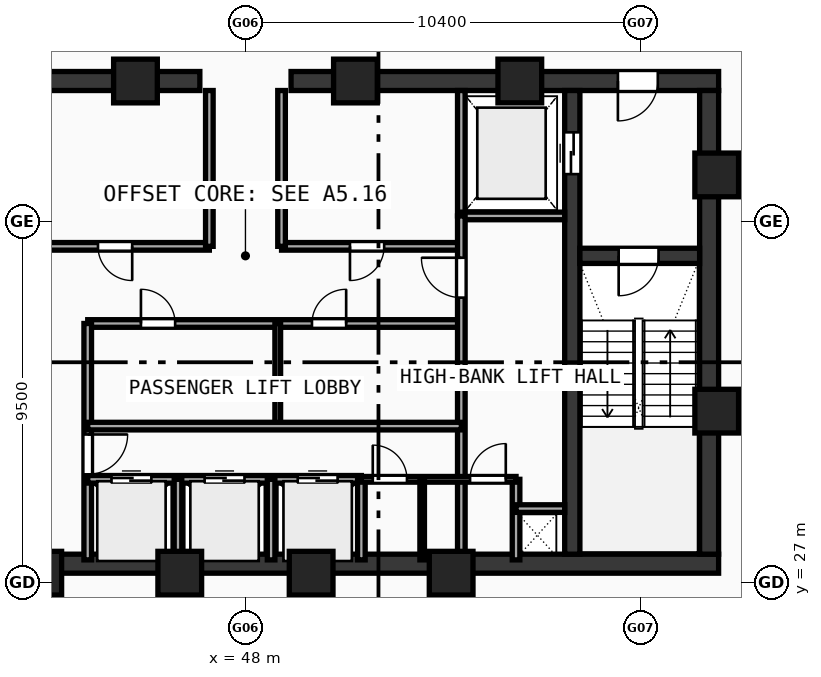
"""IFC4 building model, lengths in metres.
Left out: names, types, materials, properties, quantities, classifications, styles, units other than length and angle.
Written with IfcOpenShell. Run it as: python <this file> out.ifc"""

import sys

from ifc_helpers import new_model, si_unit, direction, frame, frame_2d, origin, origin_with_axes, origin_2d, place, context, subcontext, project, spatial, rectangle, hollow_rectangle, extrude, source, transform, mapped, element, fill, save


model = new_model("IFC4")
c1 = context("Model", 3, precision=1e-05, world=origin(), true_north=direction((0.0, 1.0)))
c2 = subcontext(c1, "Body", "Model", "MODEL_VIEW")
j1 = project(units=[si_unit("LENGTHUNIT", "METRE"), si_unit("PLANEANGLEUNIT", "RADIAN")], contexts=[c1])
p1 = place(None, origin())
s1 = spatial("IfcSite", under=j1, at=p1, CompositionType="ELEMENT")
p2 = place(p1, origin())
s2 = spatial("IfcBuilding", under=s1, at=p2, CompositionType="ELEMENT")
p3 = place(p2, frame((0.0, 0.0, 296.21)))
s3 = spatial("IfcBuildingStorey", under=s2, at=p3, CompositionType="ELEMENT", Elevation=296.21)
p4 = place(p3, frame((35.55, 27.5, 0.0), z_axis=(0.0, 0.0, 1.0), x_axis=(1.0, 0.0, 0.0)))
e1 = element("IfcWall", 1, at=p4, inside=s3, PredefinedType="SHEAR", context=c2, shape_type="SweptSolid", body=[
    extrude(rectangle(XDim=24.9, YDim=0.5, at=frame_2d((12.45, 0.0))), origin(), (0.0, 0.0, 1.0), 3.47),
])
p5 = place(p3, frame((35.55, 40.2, 0.0), z_axis=(0.0, 0.0, 1.0), x_axis=(1.0, 0.0, 0.0)))
e2 = element("IfcWall", 2, at=p5, inside=s3, PredefinedType="SHEAR", context=c2, shape_type="SweptSolid", body=[
    extrude(rectangle(XDim=11.25, YDim=0.5, at=frame_2d((5.625, 0.0))), origin(), (0.0, 0.0, 1.0), 3.47),
])
p6 = place(p5, frame((1.6, 0.0, 0.0)))
e3 = element("IfcOpeningElement", 3, at=p6, cuts=e2, PredefinedType="OPENING", context=c2, shape_type="SweptSolid", body=[
    extrude(rectangle(XDim=1.05, YDim=2.1, at=frame_2d((0.525, 1.05))), frame((0.0, 0.26, 0.0), z_axis=(0.0, -1.0, 0.0), x_axis=(1.0, 0.0, 0.0)), (0.0, 0.0, 1.0), 0.52),
])
p7 = place(p3, frame((49.2, 40.2, 0.0), z_axis=(0.0, 0.0, 1.0), x_axis=(1.0, 0.0, 0.0)))
e4 = element("IfcWall", 4, at=p7, inside=s3, PredefinedType="SHEAR", context=c2, shape_type="SweptSolid", body=[
    extrude(rectangle(XDim=11.25, YDim=0.5, at=frame_2d((5.625, 0.0))), origin(), (0.0, 0.0, 1.0), 3.47),
])
p8 = place(p7, frame((8.6, 0.0, 0.0)))
e5 = element("IfcOpeningElement", 5, at=p8, cuts=e4, PredefinedType="OPENING", context=c2, shape_type="SweptSolid", body=[
    extrude(rectangle(XDim=1.05, YDim=2.1, at=frame_2d((0.525, 1.05))), frame((0.0, 0.26, 0.0), z_axis=(0.0, -1.0, 0.0), x_axis=(1.0, 0.0, 0.0)), (0.0, 0.0, 1.0), 0.52),
])
p9 = place(p3, frame((60.2, 27.75, 0.0), z_axis=(0.0, 0.0, 1.0), x_axis=(0.0, 1.0, 0.0)))
e6 = element("IfcWall", 6, at=p9, inside=s3, PredefinedType="SHEAR", context=c2, shape_type="SweptSolid", body=[
    extrude(rectangle(XDim=12.2, YDim=0.5, at=frame_2d((6.1, 0.0))), origin(), (0.0, 0.0, 1.0), 3.47),
])
p10 = place(p3, frame((56.6, 27.75, 0.0), z_axis=(0.0, 0.0, 1.0), x_axis=(0.0, 1.0, 0.0)))
e7 = element("IfcWall", 7, at=p10, inside=s3, PredefinedType="SHEAR", context=c2, shape_type="SweptSolid", body=[
    extrude(rectangle(XDim=12.2, YDim=0.4, at=frame_2d((6.1, 0.0))), origin(), (0.0, 0.0, 1.0), 3.47),
])
p11 = place(p10, frame((10.0, 0.0, 0.0)))
e8 = element("IfcOpeningElement", 8, at=p11, cuts=e7, PredefinedType="OPENING", context=c2, shape_type="SweptSolid", body=[
    extrude(rectangle(XDim=1.1, YDim=2.1, at=frame_2d((0.55, 1.05))), frame((0.0, 0.21, 0.0), z_axis=(0.0, -1.0, 0.0), x_axis=(1.0, 0.0, 0.0)), (0.0, 0.0, 1.0), 0.42),
])
p12 = place(p3, frame((56.8, 35.6, 0.0), z_axis=(0.0, 0.0, 1.0), x_axis=(1.0, 0.0, 0.0)))
e9 = element("IfcWall", 9, at=p12, inside=s3, PredefinedType="SHEAR", context=c2, shape_type="SweptSolid", body=[
    extrude(rectangle(XDim=3.15, YDim=0.4, at=frame_2d((1.575, 0.0))), origin(), (0.0, 0.0, 1.0), 3.47),
])
p13 = place(p12, frame((1.02, 0.0, 0.0)))
e10 = element("IfcOpeningElement", 10, at=p13, cuts=e9, PredefinedType="OPENING", context=c2, shape_type="SweptSolid", body=[
    extrude(rectangle(XDim=1.05, YDim=2.1, at=frame_2d((0.525, 1.05))), frame((0.0, 0.21, 0.0), z_axis=(0.0, -1.0, 0.0), x_axis=(1.0, 0.0, 0.0)), (0.0, 0.0, 1.0), 0.42),
])
m1 = source(origin(), c2, "Body", "SweptSolid", [
    extrude(hollow_rectangle(XDim=1.15, YDim=1.15, WallThickness=0.048, at=origin_2d()), origin(), (0.0, 0.0, 1.0), 3.73),
])
for number, where, z_axis, x_axis in (
    (11, (42.588, 27.25, -0.26), (0.0, 0.0, 1.0), (1.0, 0.0, 0.0)),
    (12, (46.272, 27.25, -0.26), (0.0, 0.0, 1.0), (1.0, 0.0, 0.0)),
    (13, (49.729, 27.25, -0.26), (0.0, 0.0, 1.0), (1.0, 0.0, 0.0)),
    (14, (53.412, 27.25, -0.26), (0.0, 0.0, 1.0), (1.0, 0.0, 0.0)),
    (15, (60.4, 31.513, -0.26), (0.0, 0.0, 1.0), (1.0, 0.0, 0.0)),
    (16, (60.4, 37.729, -0.26), (0.0, 0.0, 1.0), (1.0, 0.0, 0.0)),
    (17, (55.219, 40.2, -0.26), (0.0, 0.0, 1.0), (1.0, 0.0, 0.0)),
    (18, (50.894, 40.2, -0.26), (0.0, 0.0, 1.0), (1.0, 0.0, 0.0)),
    (19, (45.106, 40.2, -0.26), (0.0, 0.0, 1.0), (1.0, 0.0, 0.0)),
):
    element("IfcColumn", number, at=place(p3, frame(where, z_axis=z_axis, x_axis=x_axis)), inside=s3, PredefinedType="COLUMN", context=c2, shape_type="MappedRepresentation", body=[
        mapped(m1, transform((0.0, 0.0, 0.0), scale=1.0)),
    ])
p14 = place(p3, frame((53.68, 36.65, 0.0), z_axis=(0.0, 0.0, 1.0), x_axis=(0.0, 1.0, 0.0)))
e20 = element("IfcWall", 20, at=p14, inside=s3, PredefinedType="SOLIDWALL", context=c2, shape_type="SweptSolid", body=[
    extrude(rectangle(XDim=3.3, YDim=0.2, at=frame_2d((1.65, 0.0))), origin(), (0.0, 0.0, 1.0), 3.47),
])
p15 = place(p3, frame((53.68, 36.65, 0.0), z_axis=(0.0, 0.0, 1.0), x_axis=(1.0, 0.0, 0.0)))
e21 = element("IfcWall", 21, at=p15, inside=s3, PredefinedType="SOLIDWALL", context=c2, shape_type="SweptSolid", body=[
    extrude(rectangle(XDim=2.72, YDim=0.2, at=frame_2d((1.36, 0.0))), origin(), (0.0, 0.0, 1.0), 3.47),
])
p16 = place(p3, frame((42.32, 35.85, 0.0), z_axis=(0.0, 0.0, 1.0), x_axis=(1.0, 0.0, 0.0)))
e22 = element("IfcWall", 22, at=p16, inside=s3, PredefinedType="SOLIDWALL", context=c2, shape_type="SweptSolid", body=[
    extrude(rectangle(XDim=4.73, YDim=0.2, at=frame_2d((2.365, 0.0))), origin(), (0.0, 0.0, 1.0), 3.47),
])
p17 = place(p16, frame((1.8, 0.0, 0.0)))
e23 = element("IfcOpeningElement", 23, at=p17, cuts=e22, PredefinedType="OPENING", context=c2, shape_type="SweptSolid", body=[
    extrude(rectangle(XDim=0.9, YDim=2.1, at=frame_2d((0.45, 1.05))), frame((0.0, 0.11, 0.0), z_axis=(0.0, -1.0, 0.0), x_axis=(1.0, 0.0, 0.0)), (0.0, 0.0, 1.0), 0.22),
])
p18 = place(p3, frame((48.95, 35.85, 0.0), z_axis=(0.0, 0.0, 1.0), x_axis=(1.0, 0.0, 0.0)))
e24 = element("IfcWall", 24, at=p18, inside=s3, PredefinedType="SOLIDWALL", context=c2, shape_type="SweptSolid", body=[
    extrude(rectangle(XDim=4.73, YDim=0.2, at=frame_2d((2.365, 0.0))), origin(), (0.0, 0.0, 1.0), 3.47),
])
p19 = place(p18, frame((1.8, 0.0, 0.0)))
e25 = element("IfcOpeningElement", 25, at=p19, cuts=e24, PredefinedType="OPENING", context=c2, shape_type="SweptSolid", body=[
    extrude(rectangle(XDim=0.9, YDim=2.1, at=frame_2d((0.45, 1.05))), frame((0.0, 0.11, 0.0), z_axis=(0.0, -1.0, 0.0), x_axis=(1.0, 0.0, 0.0)), (0.0, 0.0, 1.0), 0.22),
])
for number, where, z_axis, x_axis in (
    (26, (47.05, 35.85, 0.0), (0.0, 0.0, 1.0), (0.0, 1.0, 0.0)),
    (27, (48.95, 35.85, 0.0), (0.0, 0.0, 1.0), (0.0, 1.0, 0.0)),
):
    element("IfcWall", number, at=place(p3, frame(where, z_axis=z_axis, x_axis=x_axis)), inside=s3, PredefinedType="SOLIDWALL", context=c2, shape_type="SweptSolid", body=[
        extrude(rectangle(XDim=4.1, YDim=0.2, at=frame_2d((2.05, 0.0))), origin(), (0.0, 0.0, 1.0), 3.47),
    ])
p20 = place(p3, frame((43.85, 33.82, 0.0), z_axis=(0.0, 0.0, 1.0), x_axis=(1.0, 0.0, 0.0)))
e28 = element("IfcWall", 28, at=p20, inside=s3, PredefinedType="SOLIDWALL", context=c2, shape_type="SweptSolid", body=[
    extrude(rectangle(XDim=9.83, YDim=0.2, at=frame_2d((4.915, 0.0))), origin(), (0.0, 0.0, 1.0), 3.47),
])
p21 = place(p20, frame((1.4, 0.0, 0.0)))
e29 = element("IfcOpeningElement", 29, at=p21, cuts=e28, PredefinedType="OPENING", context=c2, shape_type="SweptSolid", body=[
    extrude(rectangle(XDim=0.9, YDim=2.1, at=frame_2d((0.45, 1.05))), frame((0.0, 0.11, 0.0), z_axis=(0.0, -1.0, 0.0), x_axis=(1.0, 0.0, 0.0)), (0.0, 0.0, 1.0), 0.22),
])
p22 = place(p20, frame((5.9, 0.0, 0.0)))
e30 = element("IfcOpeningElement", 30, at=p22, cuts=e28, PredefinedType="OPENING", context=c2, shape_type="SweptSolid", body=[
    extrude(rectangle(XDim=0.9, YDim=2.1, at=frame_2d((0.45, 1.05))), frame((0.0, 0.11, 0.0), z_axis=(0.0, -1.0, 0.0), x_axis=(1.0, 0.0, 0.0)), (0.0, 0.0, 1.0), 0.22),
])
p23 = place(p3, frame((43.85, 27.6, 0.0), z_axis=(0.0, 0.0, 1.0), x_axis=(0.0, 1.0, 0.0)))
e31 = element("IfcWall", 31, at=p23, inside=s3, PredefinedType="SOLIDWALL", context=c2, shape_type="SweptSolid", body=[
    extrude(rectangle(XDim=6.22, YDim=0.2, at=frame_2d((3.11, 0.0))), origin(), (0.0, 0.0, 1.0), 3.47),
])
p24 = place(p23, frame((2.25, 0.0, 0.0)))
e32 = element("IfcOpeningElement", 32, at=p24, cuts=e31, PredefinedType="OPENING", context=c2, shape_type="SweptSolid", body=[
    extrude(rectangle(XDim=1.05, YDim=2.1, at=frame_2d((0.525, 1.05))), frame((0.0, 0.11, 0.0), z_axis=(0.0, -1.0, 0.0), x_axis=(1.0, 0.0, 0.0)), (0.0, 0.0, 1.0), 0.22),
])
p25 = place(p3, frame((53.68, 27.6, 0.0), z_axis=(0.0, 0.0, 1.0), x_axis=(0.0, 1.0, 0.0)))
e33 = element("IfcWall", 33, at=p25, inside=s3, PredefinedType="SOLIDWALL", context=c2, shape_type="SweptSolid", body=[
    extrude(rectangle(XDim=9.05, YDim=0.2, at=frame_2d((4.525, 0.0))), origin(), (0.0, 0.0, 1.0), 3.47),
])
p26 = place(p25, frame((6.9, 0.0, 0.0)))
e34 = element("IfcOpeningElement", 34, at=p26, cuts=e33, PredefinedType="OPENING", context=c2, shape_type="SweptSolid", body=[
    extrude(rectangle(XDim=1.05, YDim=2.1, at=frame_2d((0.525, 1.05))), frame((0.0, 0.11, 0.0), z_axis=(0.0, -1.0, 0.0), x_axis=(1.0, 0.0, 0.0)), (0.0, 0.0, 1.0), 0.22),
])
p27 = place(p3, frame((48.85, 31.12, 0.0), z_axis=(0.0, 0.0, 1.0), x_axis=(0.0, 1.0, 0.0)))
e35 = element("IfcWall", 35, at=p27, inside=s3, PredefinedType="PARTITIONING", context=c2, shape_type="SweptSolid", body=[
    extrude(rectangle(XDim=2.7, YDim=0.15, at=frame_2d((1.35, 0.0))), origin(), (0.0, 0.0, 1.0), 3.47),
])
p28 = place(p3, frame((43.85, 29.72, 0.0), z_axis=(0.0, 0.0, 1.0), x_axis=(1.0, 0.0, 0.0)))
e36 = element("IfcWall", 36, at=p28, inside=s3, PredefinedType="SOLIDWALL", context=c2, shape_type="SweptSolid", body=[
    extrude(rectangle(XDim=7.2, YDim=0.2, at=frame_2d((3.6, 0.0))), origin(), (0.0, 0.0, 1.0), 3.47),
])
p29 = place(p28, frame((0.625, 0.0, 0.0)))
e37 = element("IfcOpeningElement", 37, at=p29, cuts=e36, PredefinedType="OPENING", context=c2, shape_type="SweptSolid", body=[
    extrude(rectangle(XDim=1.05, YDim=2.1, at=frame_2d((0.525, 1.05))), frame((0.0, 0.11, 0.0), z_axis=(0.0, -1.0, 0.0), x_axis=(1.0, 0.0, 0.0)), (0.0, 0.0, 1.0), 0.22),
])
p30 = place(p28, frame((3.075, 0.0, 0.0)))
e38 = element("IfcOpeningElement", 38, at=p30, cuts=e36, PredefinedType="OPENING", context=c2, shape_type="SweptSolid", body=[
    extrude(rectangle(XDim=1.05, YDim=2.1, at=frame_2d((0.525, 1.05))), frame((0.0, 0.11, 0.0), z_axis=(0.0, -1.0, 0.0), x_axis=(1.0, 0.0, 0.0)), (0.0, 0.0, 1.0), 0.22),
])
p31 = place(p28, frame((5.525, 0.0, 0.0)))
e39 = element("IfcOpeningElement", 39, at=p31, cuts=e36, PredefinedType="OPENING", context=c2, shape_type="SweptSolid", body=[
    extrude(rectangle(XDim=1.05, YDim=2.1, at=frame_2d((0.525, 1.05))), frame((0.0, 0.11, 0.0), z_axis=(0.0, -1.0, 0.0), x_axis=(1.0, 0.0, 0.0)), (0.0, 0.0, 1.0), 0.22),
])
p32 = place(p3, frame((51.05, 27.6, 0.0), z_axis=(0.0, 0.0, 1.0), x_axis=(0.0, 1.0, 0.0)))
e40 = element("IfcWall", 40, at=p32, inside=s3, PredefinedType="SOLIDWALL", context=c2, shape_type="SweptSolid", body=[
    extrude(rectangle(XDim=2.12, YDim=0.2, at=frame_2d((1.06, 0.0))), origin(), (0.0, 0.0, 1.0), 3.47),
])
p33 = place(p3, frame((43.85, 31.12, 0.0), z_axis=(0.0, 0.0, 1.0), x_axis=(1.0, 0.0, 0.0)))
e41 = element("IfcWall", 41, at=p33, inside=s3, PredefinedType="SOLIDWALL", context=c2, shape_type="SweptSolid", body=[
    extrude(rectangle(XDim=9.83, YDim=0.2, at=frame_2d((4.915, 0.0))), origin(), (0.0, 0.0, 1.0), 3.47),
])
for number, where, z_axis, x_axis in (
    (42, (46.225, 27.6, 0.0), (0.0, 0.0, 1.0), (0.0, 1.0, 0.0)),
    (43, (48.675, 27.6, 0.0), (0.0, 0.0, 1.0), (0.0, 1.0, 0.0)),
    (44, (55.12, 27.6, 0.0), (0.0, 0.0, 1.0), (0.0, 1.0, 0.0)),
):
    element("IfcWall", number, at=place(p3, frame(where, z_axis=z_axis, x_axis=x_axis)), inside=s3, PredefinedType="SOLIDWALL", context=c2, shape_type="SweptSolid", body=[
        extrude(rectangle(XDim=2.12, YDim=0.2, at=frame_2d((1.06, 0.0))), origin(), (0.0, 0.0, 1.0), 3.47),
    ])
p34 = place(p3, frame((55.12, 28.95, 0.0), z_axis=(0.0, 0.0, 1.0), x_axis=(1.0, 0.0, 0.0)))
e45 = element("IfcWall", 45, at=p34, inside=s3, PredefinedType="SOLIDWALL", context=c2, shape_type="SweptSolid", body=[
    extrude(rectangle(XDim=1.28, YDim=0.2, at=frame_2d((0.64, 0.0))), origin(), (0.0, 0.0, 1.0), 3.47),
])
p35 = place(p3, frame((51.05, 29.72, 0.0), z_axis=(0.0, 0.0, 1.0), x_axis=(1.0, 0.0, 0.0)))
e46 = element("IfcWall", 46, at=p35, inside=s3, PredefinedType="PARTITIONING", context=c2, shape_type="SweptSolid", body=[
    extrude(rectangle(XDim=4.07, YDim=0.15, at=frame_2d((2.035, 0.0))), origin(), (0.0, 0.0, 1.0), 3.47),
])
p36 = place(p35, frame((0.3, 0.0, 0.0)))
e47 = element("IfcOpeningElement", 47, at=p36, cuts=e46, PredefinedType="OPENING", context=c2, shape_type="SweptSolid", body=[
    extrude(rectangle(XDim=0.9, YDim=2.1, at=frame_2d((0.45, 1.05))), frame((0.0, 0.085, 0.0), z_axis=(0.0, -1.0, 0.0), x_axis=(1.0, 0.0, 0.0)), (0.0, 0.0, 1.0), 0.17),
])
p37 = place(p35, frame((2.86, 0.0, 0.0)))
e48 = element("IfcOpeningElement", 48, at=p37, cuts=e46, PredefinedType="OPENING", context=c2, shape_type="SweptSolid", body=[
    extrude(rectangle(XDim=0.94, YDim=2.1, at=frame_2d((0.47, 1.05))), frame((0.0, 0.085, 0.0), z_axis=(0.0, -1.0, 0.0), x_axis=(1.0, 0.0, 0.0)), (0.0, 0.0, 1.0), 0.17),
])
p38 = place(p3, frame((52.65, 27.6, 0.0), z_axis=(0.0, 0.0, 1.0), x_axis=(0.0, 1.0, 0.0)))
e49 = element("IfcWall", 49, at=p38, inside=s3, PredefinedType="PARTITIONING", context=c2, shape_type="SweptSolid", body=[
    extrude(rectangle(XDim=2.12, YDim=0.12, at=frame_2d((1.06, 0.0))), origin(), (0.0, 0.0, 1.0), 3.47),
])
m2 = source(origin(), c2, "Body", "SweptSolid", [
    extrude(rectangle(XDim=1.05, YDim=2.1, at=frame_2d((0.525, 1.05))), frame((0.0, 0.025, 0.0), z_axis=(0.0, -1.0, 0.0), x_axis=(1.0, 0.0, 0.0)), (0.0, 0.0, 1.0), 0.05),
])
p39 = place(p13, frame((1.05, 0.0, 0.0), z_axis=(0.0, 0.0, 1.0), x_axis=(-1.0, 0.0, 0.0)))
e50 = element("IfcDoor", 50, at=p39, inside=s3, OperationType="SINGLE_SWING_RIGHT", PredefinedType="DOOR", context=c2, shape_type="MappedRepresentation", body=[
    mapped(m2, transform((0.0, 0.0, 0.0), scale=1.0)),
])
fill(e10, e50)
p40 = place(p8, frame((1.05, 0.0, 0.0), z_axis=(0.0, 0.0, 1.0), x_axis=(-1.0, 0.0, 0.0)))
e51 = element("IfcDoor", 51, at=p40, inside=s3, OperationType="SINGLE_SWING_RIGHT", PredefinedType="DOOR", context=c2, shape_type="MappedRepresentation", body=[
    mapped(m2, transform((0.0, 0.0, 0.0), scale=1.0)),
])
fill(e5, e51)
m3 = source(origin(), c2, "Body", "SweptSolid", [
    extrude(rectangle(XDim=1.1, YDim=2.1, at=frame_2d((0.55, 1.05))), frame((0.0, 0.025, 0.0), z_axis=(0.0, -1.0, 0.0), x_axis=(1.0, 0.0, 0.0)), (0.0, 0.0, 1.0), 0.05),
])
p41 = place(p11, origin_with_axes())
e52 = element("IfcDoor", 52, at=p41, inside=s3, OperationType="DOUBLE_DOOR_SLIDING", PredefinedType="DOOR", context=c2, shape_type="MappedRepresentation", body=[
    mapped(m3, transform((0.0, 0.0, 0.0), scale=1.0)),
])
fill(e8, e52)
m4 = source(origin(), c2, "Body", "SweptSolid", [
    extrude(rectangle(XDim=0.9, YDim=2.1, at=frame_2d((0.45, 1.05))), frame((0.0, 0.025, 0.0), z_axis=(0.0, -1.0, 0.0), x_axis=(1.0, 0.0, 0.0)), (0.0, 0.0, 1.0), 0.05),
])
p42 = place(p17, frame((0.9, 0.0, 0.0), z_axis=(0.0, 0.0, 1.0), x_axis=(-1.0, 0.0, 0.0)))
e53 = element("IfcDoor", 53, at=p42, inside=s3, OperationType="SINGLE_SWING_LEFT", PredefinedType="DOOR", context=c2, shape_type="MappedRepresentation", body=[
    mapped(m4, transform((0.0, 0.0, 0.0), scale=1.0)),
])
fill(e23, e53)
p43 = place(p19, frame((0.9, 0.0, 0.0), z_axis=(0.0, 0.0, 1.0), x_axis=(-1.0, 0.0, 0.0)))
e54 = element("IfcDoor", 54, at=p43, inside=s3, OperationType="SINGLE_SWING_RIGHT", PredefinedType="DOOR", context=c2, shape_type="MappedRepresentation", body=[
    mapped(m4, transform((0.0, 0.0, 0.0), scale=1.0)),
])
fill(e25, e54)
p44 = place(p21, origin_with_axes())
e55 = element("IfcDoor", 55, at=p44, inside=s3, OperationType="SINGLE_SWING_LEFT", PredefinedType="DOOR", context=c2, shape_type="MappedRepresentation", body=[
    mapped(m4, transform((0.0, 0.0, 0.0), scale=1.0)),
])
fill(e29, e55)
p45 = place(p22, origin_with_axes())
e56 = element("IfcDoor", 56, at=p45, inside=s3, OperationType="SINGLE_SWING_RIGHT", PredefinedType="DOOR", context=c2, shape_type="MappedRepresentation", body=[
    mapped(m4, transform((0.0, 0.0, 0.0), scale=1.0)),
])
fill(e30, e56)
p46 = place(p24, frame((1.05, 0.0, 0.0), z_axis=(0.0, 0.0, 1.0), x_axis=(-1.0, 0.0, 0.0)))
e57 = element("IfcDoor", 57, at=p46, inside=s3, OperationType="SINGLE_SWING_LEFT", PredefinedType="DOOR", context=c2, shape_type="MappedRepresentation", body=[
    mapped(m2, transform((0.0, 0.0, 0.0), scale=1.0)),
])
fill(e32, e57)
p47 = place(p26, origin_with_axes())
e58 = element("IfcDoor", 58, at=p47, inside=s3, OperationType="SINGLE_SWING_RIGHT", PredefinedType="DOOR", context=c2, shape_type="MappedRepresentation", body=[
    mapped(m2, transform((0.0, 0.0, 0.0), scale=1.0)),
])
fill(e34, e58)
p48 = place(p29, origin_with_axes())
e59 = element("IfcDoor", 59, at=p48, inside=s3, OperationType="DOUBLE_DOOR_SLIDING", PredefinedType="DOOR", context=c2, shape_type="MappedRepresentation", body=[
    mapped(m2, transform((0.0, 0.0, 0.0), scale=1.0)),
])
fill(e37, e59)
p49 = place(p30, origin_with_axes())
e60 = element("IfcDoor", 60, at=p49, inside=s3, OperationType="DOUBLE_DOOR_SLIDING", PredefinedType="DOOR", context=c2, shape_type="MappedRepresentation", body=[
    mapped(m2, transform((0.0, 0.0, 0.0), scale=1.0)),
])
fill(e38, e60)
p50 = place(p31, origin_with_axes())
e61 = element("IfcDoor", 61, at=p50, inside=s3, OperationType="DOUBLE_DOOR_SLIDING", PredefinedType="DOOR", context=c2, shape_type="MappedRepresentation", body=[
    mapped(m2, transform((0.0, 0.0, 0.0), scale=1.0)),
])
fill(e39, e61)
p51 = place(p36, origin_with_axes())
e62 = element("IfcDoor", 62, at=p51, inside=s3, OperationType="SINGLE_SWING_LEFT", PredefinedType="DOOR", context=c2, shape_type="MappedRepresentation", body=[
    mapped(m4, transform((0.0, 0.0, 0.0), scale=1.0)),
])
fill(e47, e62)
m5 = source(origin(), c2, "Body", "SweptSolid", [
    extrude(rectangle(XDim=0.94, YDim=2.1, at=frame_2d((0.47, 1.05))), frame((0.0, 0.025, 0.0), z_axis=(0.0, -1.0, 0.0), x_axis=(1.0, 0.0, 0.0)), (0.0, 0.0, 1.0), 0.05),
])
p52 = place(p37, origin_with_axes())
e63 = element("IfcDoor", 63, at=p52, inside=s3, OperationType="SINGLE_SWING_RIGHT", PredefinedType="DOOR", context=c2, shape_type="MappedRepresentation", body=[
    mapped(m5, transform((0.0, 0.0, 0.0), scale=1.0)),
])
fill(e48, e63)
save(model, sys.argv[1])
